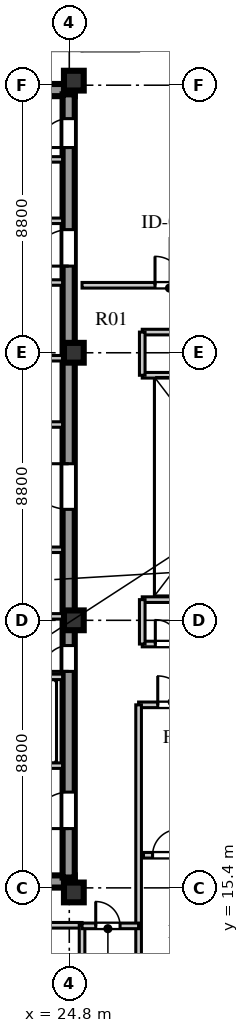
"""IFC4 building model, lengths in metres.
Left out: names, types, materials, properties, quantities, classifications, styles, units other than length and angle.
Written with IfcOpenShell. Run it as: python <this file> out.ifc"""

import sys

from ifc_helpers import new_model, si_unit, direction, frame, frame_2d, origin, origin_2d, place, context, subcontext, project, spatial, rectangle, extrude, element, fill, save


model = new_model("IFC4")
c1 = context("Model", 3, precision=1e-05, world=origin(), true_north=direction((0.0, 1.0)))
c2 = subcontext(c1, "Body", "Model", "MODEL_VIEW")
j1 = project(units=[si_unit("LENGTHUNIT", "METRE"), si_unit("PLANEANGLEUNIT", "RADIAN")], contexts=[c1])
p1 = place(None, origin())
s1 = spatial("IfcSite", under=j1, at=p1, CompositionType="ELEMENT")
p2 = place(p1, origin())
s2 = spatial("IfcBuilding", under=s1, at=p2, CompositionType="ELEMENT")
p3 = place(p2, frame((0.0, 0.0, 342.9)))
s3 = spatial("IfcBuildingStorey", under=s2, at=p3, CompositionType="ELEMENT", Elevation=342.9)
for number, where, z_axis, x_axis in (
    (1, (15.5, 15.61, 0.0), (0.0, 0.0, 1.0), (1.0, 0.0, 0.0)),
    (2, (15.5, 41.64, 0.0), (0.0, 0.0, 1.0), (1.0, 0.0, 0.0)),
):
    element("IfcWall", number, at=place(p3, frame(where, z_axis=z_axis, x_axis=x_axis)), inside=s3, PredefinedType="SHEAR", context=c2, shape_type="SweptSolid", body=[
        extrude(rectangle(XDim=9.48, YDim=0.4, at=frame_2d((4.74, 0.0))), origin(), (0.0, 0.0, 1.0), 3.55),
    ])
p4 = place(p3, frame((24.78, 15.74, 0.0), z_axis=(0.0, 0.0, 1.0), x_axis=(0.0, 1.0, 0.0)))
e3 = element("IfcWall", 3, at=p4, inside=s3, PredefinedType="SHEAR", context=c2, shape_type="SweptSolid", body=[
    extrude(rectangle(XDim=25.76, YDim=0.4, at=frame_2d((12.88, 0.0))), origin(), (0.0, 0.0, 1.0), 3.55),
])
p5 = place(p4, frame((1.61, 0.0, 0.0)))
e4 = element("IfcOpeningElement", 4, at=p5, cuts=e3, PredefinedType="OPENING", context=c2, shape_type="SweptSolid", body=[
    extrude(rectangle(XDim=1.2, YDim=2.1, at=frame_2d((0.6, 1.05))), frame((0.0, 0.21, 0.0), z_axis=(0.0, -1.0, 0.0), x_axis=(1.0, 0.0, 0.0)), (0.0, 0.0, 1.0), 0.42),
])
p6 = place(p4, frame((6.78, 0.0, 0.0)))
e5 = element("IfcOpeningElement", 5, at=p6, cuts=e3, PredefinedType="OPENING", context=c2, shape_type="SweptSolid", body=[
    extrude(rectangle(XDim=0.85, YDim=2.06, at=frame_2d((0.425, 1.03))), frame((0.0, 0.21, 0.0), z_axis=(0.0, -1.0, 0.0), x_axis=(1.0, 0.0, 0.0)), (0.0, 0.0, 1.0), 0.42),
])
p7 = place(p4, frame((12.11, 0.0, 0.0)))
e6 = element("IfcOpeningElement", 6, at=p7, cuts=e3, PredefinedType="OPENING", context=c2, shape_type="SweptSolid", body=[
    extrude(rectangle(XDim=1.5, YDim=2.12, at=frame_2d((0.75, 1.06))), frame((0.0, 0.21, 0.0), z_axis=(0.0, -1.0, 0.0), x_axis=(1.0, 0.0, 0.0)), (0.0, 0.0, 1.0), 0.42),
])
p8 = place(p4, frame((20.11, 0.0, 0.0)))
e7 = element("IfcOpeningElement", 7, at=p8, cuts=e3, PredefinedType="OPENING", context=c2, shape_type="SweptSolid", body=[
    extrude(rectangle(XDim=1.2, YDim=2.12, at=frame_2d((0.6, 1.06))), frame((0.0, 0.21, 0.0), z_axis=(0.0, -1.0, 0.0), x_axis=(1.0, 0.0, 0.0)), (0.0, 0.0, 1.0), 0.42),
])
p9 = place(p4, frame((24.01, 0.0, 0.0)))
e8 = element("IfcOpeningElement", 8, at=p9, cuts=e3, PredefinedType="OPENING", context=c2, shape_type="SweptSolid", body=[
    extrude(rectangle(XDim=0.95, YDim=2.1, at=frame_2d((0.475, 1.05))), frame((0.0, 0.21, 0.0), z_axis=(0.0, -1.0, 0.0), x_axis=(1.0, 0.0, 0.0)), (0.0, 0.0, 1.0), 0.42),
])
for number, where, z_axis, x_axis in (
    (9, (24.95, 15.25, 0.0), (0.0, 0.0, 1.0), (1.0, 0.0, 0.0)),
    (10, (24.95, 24.2, 0.0), (0.0, 0.0, 1.0), (1.0, 0.0, 0.0)),
    (11, (24.95, 33.0, 0.0), (0.0, 0.0, 1.0), (1.0, 0.0, 0.0)),
    (12, (24.95, 41.95, 0.0), (0.0, 0.0, 1.0), (1.0, 0.0, 0.0)),
):
    element("IfcColumn", number, at=place(p3, frame(where, z_axis=z_axis, x_axis=x_axis)), inside=s3, PredefinedType="COLUMN", context=c2, shape_type="SweptSolid", body=[
        extrude(rectangle(XDim=0.65, YDim=0.65, at=origin_2d()), origin(), (0.0, 0.0, 1.0), 3.55),
    ])
p10 = place(p3, frame((19.64, 19.42, 0.0), z_axis=(0.0, 0.0, 1.0), x_axis=(1.0, 0.0, 0.0)))
e13 = element("IfcWall", 13, at=p10, inside=s3, PredefinedType="SOLIDWALL", context=c2, shape_type="SweptSolid", body=[
    extrude(rectangle(XDim=4.94, YDim=0.18, at=frame_2d((2.47, 0.0))), origin(), (0.0, 0.0, 1.0), 3.55),
])
p11 = place(p10, frame((0.72, 0.0, 0.0)))
e14 = element("IfcOpeningElement", 14, at=p11, cuts=e13, PredefinedType="OPENING", context=c2, shape_type="SweptSolid", body=[
    extrude(rectangle(XDim=1.1, YDim=2.1, at=frame_2d((0.55, 1.05))), frame((0.0, 0.1, 0.0), z_axis=(0.0, -1.0, 0.0), x_axis=(1.0, 0.0, 0.0)), (0.0, 0.0, 1.0), 0.2),
])
p12 = place(p10, frame((3.02, 0.0, 0.0)))
e15 = element("IfcOpeningElement", 15, at=p12, cuts=e13, PredefinedType="OPENING", context=c2, shape_type="SweptSolid", body=[
    extrude(rectangle(XDim=1.1, YDim=2.1, at=frame_2d((0.55, 1.05))), frame((0.0, 0.1, 0.0), z_axis=(0.0, -1.0, 0.0), x_axis=(1.0, 0.0, 0.0)), (0.0, 0.0, 1.0), 0.2),
])
p13 = place(p3, frame((19.64, 22.34, 0.0), z_axis=(0.0, 0.0, 1.0), x_axis=(1.0, 0.0, 0.0)))
e16 = element("IfcWall", 16, at=p13, inside=s3, PredefinedType="SOLIDWALL", context=c2, shape_type="SweptSolid", body=[
    extrude(rectangle(XDim=4.94, YDim=0.18, at=frame_2d((2.47, 0.0))), origin(), (0.0, 0.0, 1.0), 3.55),
])
p14 = place(p3, frame((15.9, 26.52, 0.0), z_axis=(0.0, 0.0, 1.0), x_axis=(1.0, 0.0, 0.0)))
e17 = element("IfcWall", 17, at=p14, inside=s3, PredefinedType="SOLIDWALL", context=c2, shape_type="SweptSolid", body=[
    extrude(rectangle(XDim=8.68, YDim=0.18, at=frame_2d((4.34, 0.0))), origin(), (0.0, 0.0, 1.0), 3.55),
])
p15 = place(p14, frame((2.5, 0.0, 0.0)))
e18 = element("IfcOpeningElement", 18, at=p15, cuts=e17, PredefinedType="OPENING", context=c2, shape_type="SweptSolid", body=[
    extrude(rectangle(XDim=0.95, YDim=2.1, at=frame_2d((0.475, 1.05))), frame((0.0, 0.1, 0.0), z_axis=(0.0, -1.0, 0.0), x_axis=(1.0, 0.0, 0.0)), (0.0, 0.0, 1.0), 0.2),
])
p16 = place(p14, frame((6.0, 0.0, 0.0)))
e19 = element("IfcOpeningElement", 19, at=p16, cuts=e17, PredefinedType="OPENING", context=c2, shape_type="SweptSolid", body=[
    extrude(rectangle(XDim=0.95, YDim=2.1, at=frame_2d((0.475, 1.05))), frame((0.0, 0.1, 0.0), z_axis=(0.0, -1.0, 0.0), x_axis=(1.0, 0.0, 0.0)), (0.0, 0.0, 1.0), 0.2),
])
p17 = place(p3, frame((15.9, 24.33, 0.0), z_axis=(0.0, 0.0, 1.0), x_axis=(1.0, 0.0, 0.0)))
e20 = element("IfcWall", 20, at=p17, inside=s3, PredefinedType="SOLIDWALL", context=c2, shape_type="SweptSolid", body=[
    extrude(rectangle(XDim=8.68, YDim=0.18, at=frame_2d((4.34, 0.0))), origin(), (0.0, 0.0, 1.0), 2.95),
])
p18 = place(p3, frame((15.9, 30.64, 0.0), z_axis=(0.0, 0.0, 1.0), x_axis=(1.0, 0.0, 0.0)))
e21 = element("IfcWall", 21, at=p18, inside=s3, PredefinedType="SOLIDWALL", context=c2, shape_type="SweptSolid", body=[
    extrude(rectangle(XDim=8.68, YDim=0.18, at=frame_2d((4.34, 0.0))), origin(), (0.0, 0.0, 1.0), 3.55),
])
p19 = place(p18, frame((3.7, 0.0, 0.0)))
e22 = element("IfcOpeningElement", 22, at=p19, cuts=e21, PredefinedType="OPENING", context=c2, shape_type="SweptSolid", body=[
    extrude(rectangle(XDim=0.95, YDim=2.1, at=frame_2d((0.475, 1.05))), frame((0.0, 0.1, 0.0), z_axis=(0.0, -1.0, 0.0), x_axis=(1.0, 0.0, 0.0)), (0.0, 0.0, 1.0), 0.2),
])
p20 = place(p3, frame((15.9, 32.82, 0.0), z_axis=(0.0, 0.0, 1.0), x_axis=(1.0, 0.0, 0.0)))
e23 = element("IfcWall", 23, at=p20, inside=s3, PredefinedType="SOLIDWALL", context=c2, shape_type="SweptSolid", body=[
    extrude(rectangle(XDim=8.68, YDim=0.18, at=frame_2d((4.34, 0.0))), origin(), (0.0, 0.0, 1.0), 2.95),
])
p21 = place(p3, frame((22.02, 35.31, 0.0), z_axis=(0.0, 0.0, 1.0), x_axis=(1.0, 0.0, 0.0)))
e24 = element("IfcWall", 24, at=p21, inside=s3, PredefinedType="SOLIDWALL", context=c2, shape_type="SweptSolid", body=[
    extrude(rectangle(XDim=2.56, YDim=0.18, at=frame_2d((1.28, 0.0))), origin(), (0.0, 0.0, 1.0), 3.55),
])
p22 = place(p21, frame((0.55, 0.0, 0.0)))
e25 = element("IfcOpeningElement", 25, at=p22, cuts=e24, PredefinedType="OPENING", context=c2, shape_type="SweptSolid", body=[
    extrude(rectangle(XDim=1.0, YDim=2.1, at=frame_2d((0.5, 1.05))), frame((0.0, 0.1, 0.0), z_axis=(0.0, -1.0, 0.0), x_axis=(1.0, 0.0, 0.0)), (0.0, 0.0, 1.0), 0.2),
])
p23 = place(p3, frame((19.64, 37.34, 0.0), z_axis=(0.0, 0.0, 1.0), x_axis=(1.0, 0.0, 0.0)))
e26 = element("IfcWall", 26, at=p23, inside=s3, PredefinedType="SOLIDWALL", context=c2, shape_type="SweptSolid", body=[
    extrude(rectangle(XDim=4.94, YDim=0.18, at=frame_2d((2.47, 0.0))), origin(), (0.0, 0.0, 1.0), 3.55),
])
p24 = place(p23, frame((0.45, 0.0, 0.0)))
e27 = element("IfcOpeningElement", 27, at=p24, cuts=e26, PredefinedType="OPENING", context=c2, shape_type="SweptSolid", body=[
    extrude(rectangle(XDim=1.0, YDim=2.1, at=frame_2d((0.5, 1.05))), frame((0.0, 0.1, 0.0), z_axis=(0.0, -1.0, 0.0), x_axis=(1.0, 0.0, 0.0)), (0.0, 0.0, 1.0), 0.2),
])
p25 = place(p23, frame((2.5, 0.0, 0.0)))
e28 = element("IfcOpeningElement", 28, at=p25, cuts=e26, PredefinedType="OPENING", context=c2, shape_type="SweptSolid", body=[
    extrude(rectangle(XDim=1.0, YDim=2.1, at=frame_2d((0.5, 1.05))), frame((0.0, 0.1, 0.0), z_axis=(0.0, -1.0, 0.0), x_axis=(1.0, 0.0, 0.0)), (0.0, 0.0, 1.0), 0.2),
])
p26 = place(p3, frame((19.64, 39.36, 0.0), z_axis=(0.0, 0.0, 1.0), x_axis=(1.0, 0.0, 0.0)))
e29 = element("IfcWall", 29, at=p26, inside=s3, PredefinedType="SOLIDWALL", context=c2, shape_type="SweptSolid", body=[
    extrude(rectangle(XDim=4.94, YDim=0.18, at=frame_2d((2.47, 0.0))), origin(), (0.0, 0.0, 1.0), 3.55),
])
p27 = place(p3, frame((27.08, 21.42, 0.0), z_axis=(0.0, 0.0, 1.0), x_axis=(1.0, 0.0, 0.0)))
e30 = element("IfcWall", 30, at=p27, inside=s3, PredefinedType="SOLIDWALL", context=c2, shape_type="SweptSolid", body=[
    extrude(rectangle(XDim=8.17, YDim=0.185, at=frame_2d((4.085, 0.0))), origin(), (0.0, 0.0, 1.0), 3.25),
])
p28 = place(p27, frame((0.63, 0.0, 0.0)))
e31 = element("IfcOpeningElement", 31, at=p28, cuts=e30, PredefinedType="OPENING", context=c2, shape_type="SweptSolid", body=[
    extrude(rectangle(XDim=0.95, YDim=2.1, at=frame_2d((0.475, 1.05))), frame((0.0, 0.103, 0.0), z_axis=(0.0, -1.0, 0.0), x_axis=(1.0, 0.0, 0.0)), (0.0, 0.0, 1.0), 0.205),
])
p29 = place(p3, frame((27.08, 11.98, 0.0), z_axis=(0.0, 0.0, 1.0), x_axis=(0.0, 1.0, 0.0)))
e32 = element("IfcWall", 32, at=p29, inside=s3, PredefinedType="SOLIDWALL", context=c2, shape_type="SweptSolid", body=[
    extrude(rectangle(XDim=9.44, YDim=0.185, at=frame_2d((4.72, 0.0))), origin(), (0.0, 0.0, 1.0), 3.55),
])
p30 = place(p3, frame((25.22, 35.22, 0.0), z_axis=(0.0, 0.0, 1.0), x_axis=(1.0, 0.0, 0.0)))
e33 = element("IfcWall", 33, at=p30, inside=s3, PredefinedType="SOLIDWALL", context=c2, shape_type="SweptSolid", body=[
    extrude(rectangle(XDim=9.5, YDim=0.185, at=frame_2d((4.75, 0.0))), origin(), (0.0, 0.0, 1.0), 3.55),
])
p31 = place(p30, frame((2.4, 0.0, 0.0)))
e34 = element("IfcOpeningElement", 34, at=p31, cuts=e33, PredefinedType="OPENING", context=c2, shape_type="SweptSolid", body=[
    extrude(rectangle(XDim=0.95, YDim=2.08, at=frame_2d((0.475, 1.04))), frame((0.0, 0.103, 0.0), z_axis=(0.0, -1.0, 0.0), x_axis=(1.0, 0.0, 0.0)), (0.0, 0.0, 1.0), 0.205),
])
p32 = place(p30, frame((6.2, 0.0, 0.0)))
e35 = element("IfcOpeningElement", 35, at=p32, cuts=e33, PredefinedType="OPENING", context=c2, shape_type="SweptSolid", body=[
    extrude(rectangle(XDim=0.95, YDim=2.08, at=frame_2d((0.475, 1.04))), frame((0.0, 0.103, 0.0), z_axis=(0.0, -1.0, 0.0), x_axis=(1.0, 0.0, 0.0)), (0.0, 0.0, 1.0), 0.205),
])
p33 = place(p3, frame((14.75, 14.17, 0.0), z_axis=(0.0, 0.0, 1.0), x_axis=(1.0, 0.0, 0.0)))
e36 = element("IfcWall", 36, at=p33, inside=s3, PredefinedType="SOLIDWALL", context=c2, shape_type="SweptSolid", body=[
    extrude(rectangle(XDim=10.47, YDim=0.185, at=frame_2d((5.235, 0.0))), origin(), (0.0, 0.0, 1.0), 3.55),
])
p34 = place(p33, frame((3.2, 0.0, 0.0)))
e37 = element("IfcOpeningElement", 37, at=p34, cuts=e36, PredefinedType="OPENING", context=c2, shape_type="SweptSolid", body=[
    extrude(rectangle(XDim=0.95, YDim=2.08, at=frame_2d((0.475, 1.04))), frame((0.0, 0.103, 0.0), z_axis=(0.0, -1.0, 0.0), x_axis=(1.0, 0.0, 0.0)), (0.0, 0.0, 1.0), 0.205),
])
p35 = place(p3, frame((25.22, 11.98, 0.0), z_axis=(0.0, 0.0, 1.0), x_axis=(0.0, 1.0, 0.0)))
e38 = element("IfcWall", 38, at=p35, inside=s3, PredefinedType="SOLIDWALL", context=c2, shape_type="SweptSolid", body=[
    extrude(rectangle(XDim=2.19, YDim=0.185, at=frame_2d((1.095, 0.0))), origin(), (0.0, 0.0, 1.0), 3.1),
])
p36 = place(p3, frame((27.24, 16.473, 0.0), z_axis=(0.0, 0.0, 1.0), x_axis=(1.0, 0.0, 0.0)))
e39 = element("IfcWall", 39, at=p36, inside=s3, PredefinedType="SOLIDWALL", context=c2, shape_type="SweptSolid", body=[
    extrude(rectangle(XDim=8.16, YDim=0.185, at=frame_2d((4.08, 0.0))), origin(), (0.0, 0.0, 1.0), 3.55),
])
p37 = place(p36, frame((0.3, 0.0, 0.0)))
e40 = element("IfcOpeningElement", 40, at=p37, cuts=e39, PredefinedType="OPENING", context=c2, shape_type="SweptSolid", body=[
    extrude(rectangle(XDim=0.85, YDim=2.08, at=frame_2d((0.425, 1.04))), frame((0.0, 0.103, 0.0), z_axis=(0.0, -1.0, 0.0), x_axis=(1.0, 0.0, 0.0)), (0.0, 0.0, 1.0), 0.205),
])
p38 = place(p36, frame((3.09, 0.0, 0.0)))
e41 = element("IfcOpeningElement", 41, at=p38, cuts=e39, PredefinedType="OPENING", context=c2, shape_type="SweptSolid", body=[
    extrude(rectangle(XDim=0.85, YDim=2.08, at=frame_2d((0.425, 1.04))), frame((0.0, 0.103, 0.0), z_axis=(0.0, -1.0, 0.0), x_axis=(1.0, 0.0, 0.0)), (0.0, 0.0, 1.0), 0.205),
])
p39 = place(p3, frame((27.2, 23.42, 0.0), z_axis=(0.0, 0.0, 1.0), x_axis=(1.0, 0.0, 0.0)))
e42 = element("IfcWall", 42, at=p39, inside=s3, PredefinedType="SOLIDWALL", context=c2, shape_type="SweptSolid", body=[
    extrude(rectangle(XDim=6.82, YDim=0.185, at=frame_2d((3.41, 0.0))), origin(), (0.0, 0.0, 1.0), 3.55),
])
p40 = place(p39, frame((0.43, 0.0, 0.0)))
e43 = element("IfcOpeningElement", 43, at=p40, cuts=e42, PredefinedType="OPENING", context=c2, shape_type="SweptSolid", body=[
    extrude(rectangle(XDim=0.8, YDim=2.05, at=frame_2d((0.4, 1.025))), frame((0.0, 0.103, 0.0), z_axis=(0.0, -1.0, 0.0), x_axis=(1.0, 0.0, 0.0)), (0.0, 0.0, 1.0), 0.205),
])
p41 = place(p3, frame((27.2, 24.88, 0.0), z_axis=(0.0, 0.0, 1.0), x_axis=(1.0, 0.0, 0.0)))
e44 = element("IfcWall", 44, at=p41, inside=s3, PredefinedType="SOLIDWALL", context=c2, shape_type="SweptSolid", body=[
    extrude(rectangle(XDim=6.82, YDim=0.185, at=frame_2d((3.41, 0.0))), origin(), (0.0, 0.0, 1.0), 3.0),
])
p42 = place(p3, frame((27.2, 23.42, 0.0), z_axis=(0.0, 0.0, 1.0), x_axis=(0.0, 1.0, 0.0)))
e45 = element("IfcWall", 45, at=p42, inside=s3, PredefinedType="SOLIDWALL", context=c2, shape_type="SweptSolid", body=[
    extrude(rectangle(XDim=1.46, YDim=0.185, at=frame_2d((0.73, 0.0))), origin(), (0.0, 0.0, 1.0), 3.55),
])
p43 = place(p3, frame((25.22, 14.15, 0.0), z_axis=(0.0, 0.0, 1.0), x_axis=(1.0, 0.0, 0.0)))
e46 = element("IfcWall", 46, at=p43, inside=s3, PredefinedType="SOLIDWALL", context=c2, shape_type="SweptSolid", body=[
    extrude(rectangle(XDim=1.86, YDim=0.185, at=frame_2d((0.93, 0.0))), origin(), (0.0, 0.0, 1.0), 3.55),
])
p44 = place(p43, frame((0.45, 0.0, 0.0)))
e47 = element("IfcOpeningElement", 47, at=p44, cuts=e46, PredefinedType="OPENING", context=c2, shape_type="SweptSolid", body=[
    extrude(rectangle(XDim=0.8, YDim=2.05, at=frame_2d((0.4, 1.025))), frame((0.0, 0.103, 0.0), z_axis=(0.0, -1.0, 0.0), x_axis=(1.0, 0.0, 0.0)), (0.0, 0.0, 1.0), 0.205),
])
p45 = place(p3, frame((27.2, 33.68, 0.0), z_axis=(0.0, 0.0, 1.0), x_axis=(1.0, 0.0, 0.0)))
e48 = element("IfcWall", 48, at=p45, inside=s3, PredefinedType="SOLIDWALL", context=c2, shape_type="SweptSolid", body=[
    extrude(rectangle(XDim=6.2, YDim=0.185, at=frame_2d((3.1, 0.0))), origin(), (0.0, 0.0, 1.0), 3.55),
])
p46 = place(p45, frame((1.2, 0.0, 0.0)))
e49 = element("IfcOpeningElement", 49, at=p46, cuts=e48, PredefinedType="OPENING", context=c2, shape_type="SweptSolid", body=[
    extrude(rectangle(XDim=0.8, YDim=2.05, at=frame_2d((0.4, 1.025))), frame((0.0, 0.103, 0.0), z_axis=(0.0, -1.0, 0.0), x_axis=(1.0, 0.0, 0.0)), (0.0, 0.0, 1.0), 0.205),
])
p47 = place(p3, frame((27.2, 32.26, 0.0), z_axis=(0.0, 0.0, 1.0), x_axis=(1.0, 0.0, 0.0)))
e50 = element("IfcWall", 50, at=p47, inside=s3, PredefinedType="SOLIDWALL", context=c2, shape_type="SweptSolid", body=[
    extrude(rectangle(XDim=6.2, YDim=0.185, at=frame_2d((3.1, 0.0))), origin(), (0.0, 0.0, 1.0), 3.0),
])
p48 = place(p3, frame((27.2, 32.26, 0.0), z_axis=(0.0, 0.0, 1.0), x_axis=(0.0, 1.0, 0.0)))
e51 = element("IfcWall", 51, at=p48, inside=s3, PredefinedType="SOLIDWALL", context=c2, shape_type="SweptSolid", body=[
    extrude(rectangle(XDim=1.42, YDim=0.185, at=frame_2d((0.71, 0.0))), origin(), (0.0, 0.0, 1.0), 3.55),
])
p49 = place(p5, frame((1.2, 0.0, 0.0), z_axis=(0.0, 0.0, 1.0), x_axis=(-1.0, 0.0, 0.0)))
e52 = element("IfcDoor", 52, at=p49, inside=s3, OperationType="SINGLE_SWING_RIGHT", PredefinedType="DOOR", context=c2, shape_type="SweptSolid", body=[
    extrude(rectangle(XDim=1.2, YDim=2.1, at=frame_2d((0.6, 1.05))), frame((0.0, 0.025, 0.0), z_axis=(0.0, -1.0, 0.0), x_axis=(1.0, 0.0, 0.0)), (0.0, 0.0, 1.0), 0.05),
])
fill(e4, e52)
p50 = place(p6, frame((0.85, 0.0, 0.0), z_axis=(0.0, 0.0, 1.0), x_axis=(-1.0, 0.0, 0.0)))
e53 = element("IfcDoor", 53, at=p50, inside=s3, OperationType="SINGLE_SWING_RIGHT", PredefinedType="DOOR", context=c2, shape_type="SweptSolid", body=[
    extrude(rectangle(XDim=0.85, YDim=2.06, at=frame_2d((0.425, 1.03))), frame((0.0, 0.025, 0.0), z_axis=(0.0, -1.0, 0.0), x_axis=(1.0, 0.0, 0.0)), (0.0, 0.0, 1.0), 0.05),
])
fill(e5, e53)
p51 = place(p7, frame((1.5, 0.0, 0.0), z_axis=(0.0, 0.0, 1.0), x_axis=(-1.0, 0.0, 0.0)))
e54 = element("IfcDoor", 54, at=p51, inside=s3, OperationType="SINGLE_SWING_LEFT", PredefinedType="DOOR", context=c2, shape_type="SweptSolid", body=[
    extrude(rectangle(XDim=1.5, YDim=2.12, at=frame_2d((0.75, 1.06))), frame((0.0, 0.025, 0.0), z_axis=(0.0, -1.0, 0.0), x_axis=(1.0, 0.0, 0.0)), (0.0, 0.0, 1.0), 0.05),
])
fill(e6, e54)
p52 = place(p8, frame((1.2, 0.0, 0.0), z_axis=(0.0, 0.0, 1.0), x_axis=(-1.0, 0.0, 0.0)))
e55 = element("IfcDoor", 55, at=p52, inside=s3, OperationType="SINGLE_SWING_RIGHT", PredefinedType="DOOR", context=c2, shape_type="SweptSolid", body=[
    extrude(rectangle(XDim=1.2, YDim=2.12, at=frame_2d((0.6, 1.06))), frame((0.0, 0.025, 0.0), z_axis=(0.0, -1.0, 0.0), x_axis=(1.0, 0.0, 0.0)), (0.0, 0.0, 1.0), 0.05),
])
fill(e7, e55)
p53 = place(p9, frame((0.95, 0.0, 0.0), z_axis=(0.0, 0.0, 1.0), x_axis=(-1.0, 0.0, 0.0)))
e56 = element("IfcDoor", 56, at=p53, inside=s3, OperationType="SINGLE_SWING_RIGHT", PredefinedType="DOOR", context=c2, shape_type="SweptSolid", body=[
    extrude(rectangle(XDim=0.95, YDim=2.1, at=frame_2d((0.475, 1.05))), frame((0.0, 0.025, 0.0), z_axis=(0.0, -1.0, 0.0), x_axis=(1.0, 0.0, 0.0)), (0.0, 0.0, 1.0), 0.05),
])
fill(e8, e56)
p54 = place(p37, frame((0.85, 0.0, 0.0), z_axis=(0.0, 0.0, 1.0), x_axis=(-1.0, 0.0, 0.0)))
e57 = element("IfcDoor", 57, at=p54, inside=s3, OperationType="SINGLE_SWING_LEFT", PredefinedType="DOOR", context=c2, shape_type="SweptSolid", body=[
    extrude(rectangle(XDim=0.85, YDim=2.08, at=frame_2d((0.425, 1.04))), frame((0.0, 0.025, 0.0), z_axis=(0.0, -1.0, 0.0), x_axis=(1.0, 0.0, 0.0)), (0.0, 0.0, 1.0), 0.05),
])
fill(e40, e57)
p55 = place(p28, frame((0.95, 0.0, 0.0), z_axis=(0.0, 0.0, 1.0), x_axis=(-1.0, 0.0, 0.0)))
e58 = element("IfcDoor", 58, at=p55, inside=s3, OperationType="SINGLE_SWING_RIGHT", PredefinedType="DOOR", context=c2, shape_type="SweptSolid", body=[
    extrude(rectangle(XDim=0.95, YDim=2.1, at=frame_2d((0.475, 1.05))), frame((0.0, 0.025, 0.0), z_axis=(0.0, -1.0, 0.0), x_axis=(1.0, 0.0, 0.0)), (0.0, 0.0, 1.0), 0.05),
])
fill(e31, e58)
p56 = place(p31, origin())
e59 = element("IfcDoor", 59, at=p56, inside=s3, OperationType="SINGLE_SWING_LEFT", PredefinedType="DOOR", context=c2, shape_type="SweptSolid", body=[
    extrude(rectangle(XDim=0.95, YDim=2.08, at=frame_2d((0.475, 1.04))), frame((0.0, 0.025, 0.0), z_axis=(0.0, -1.0, 0.0), x_axis=(1.0, 0.0, 0.0)), (0.0, 0.0, 1.0), 0.05),
])
fill(e34, e59)
p57 = place(p40, origin())
e60 = element("IfcDoor", 60, at=p57, inside=s3, OperationType="SINGLE_SWING_LEFT", PredefinedType="DOOR", context=c2, shape_type="SweptSolid", body=[
    extrude(rectangle(XDim=0.8, YDim=2.05, at=frame_2d((0.4, 1.025))), frame((0.0, 0.025, 0.0), z_axis=(0.0, -1.0, 0.0), x_axis=(1.0, 0.0, 0.0)), (0.0, 0.0, 1.0), 0.05),
])
fill(e43, e60)
p58 = place(p44, origin())
e61 = element("IfcDoor", 61, at=p58, inside=s3, OperationType="SINGLE_SWING_LEFT", PredefinedType="DOOR", context=c2, shape_type="SweptSolid", body=[
    extrude(rectangle(XDim=0.8, YDim=2.05, at=frame_2d((0.4, 1.025))), frame((0.0, 0.025, 0.0), z_axis=(0.0, -1.0, 0.0), x_axis=(1.0, 0.0, 0.0)), (0.0, 0.0, 1.0), 0.05),
])
fill(e47, e61)
save(model, sys.argv[1])
